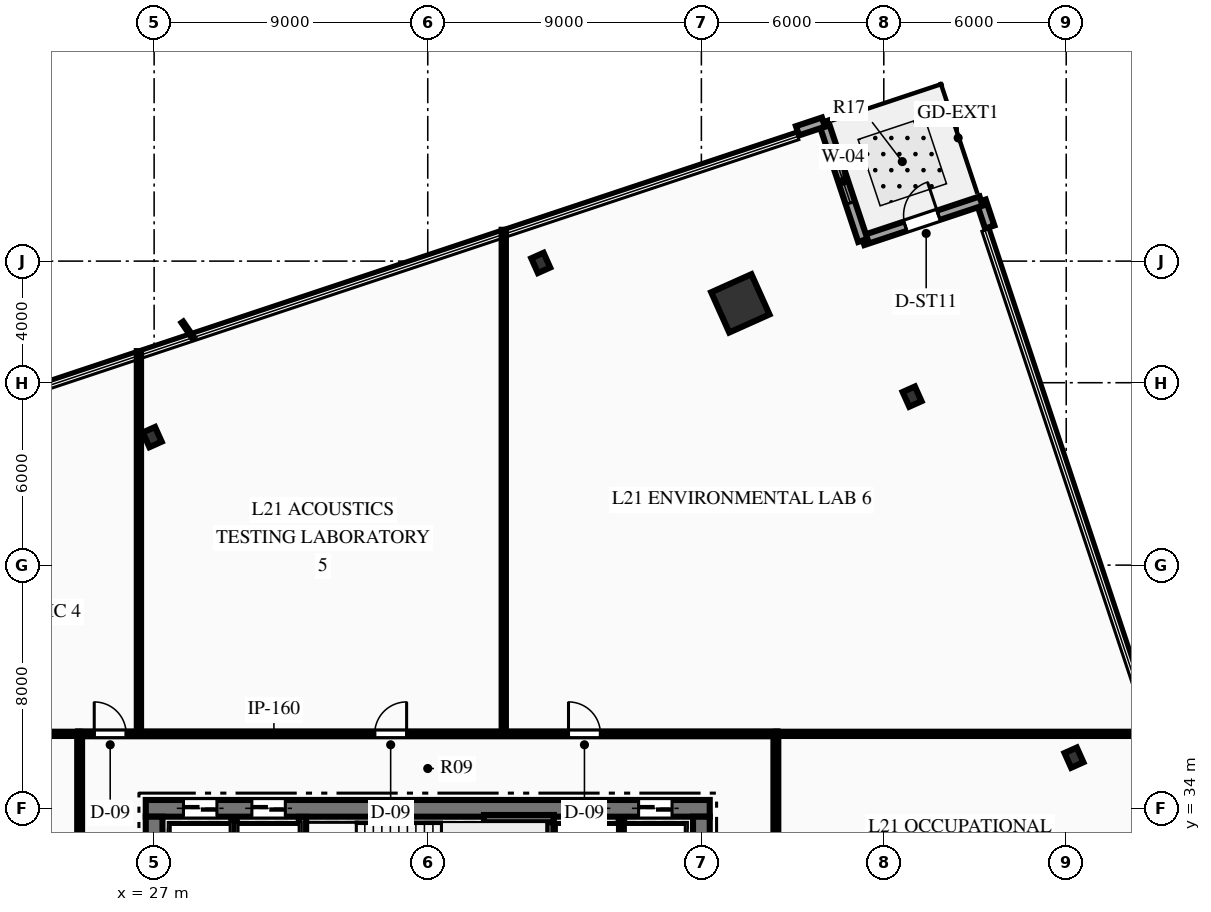
"""IFC4 building model, lengths in metres.
Left out: names, types, materials, properties, quantities, classifications, styles, units other than length and angle.
Written with IfcOpenShell. Run it as: python <this file> out.ifc"""

import sys

from ifc_helpers import new_model, si_unit, direction, frame, frame_2d, origin, origin_2d, place, context, subcontext, project, spatial, rectangle, hollow_rectangle, i_section, extrude, element, fill, save


model = new_model("IFC4")
c1 = context("Model", 3, precision=1e-05, world=origin(), true_north=direction((0.0, 1.0)))
c2 = subcontext(c1, "Body", "Model", "MODEL_VIEW")
j1 = project(units=[si_unit("LENGTHUNIT", "METRE"), si_unit("PLANEANGLEUNIT", "RADIAN")], contexts=[c1])
p1 = place(None, origin())
s1 = spatial("IfcSite", under=j1, at=p1, CompositionType="ELEMENT")
p2 = place(p1, origin())
s2 = spatial("IfcBuilding", under=s1, at=p2, CompositionType="ELEMENT")
p3 = place(p2, frame((0.0, 0.0, 90.45)))
s3 = spatial("IfcBuildingStorey", under=s2, at=p3, CompositionType="ELEMENT", Elevation=90.45)
p4 = place(p3, frame((26.725, 34.0, 0.0), z_axis=(0.0, 0.0, 1.0), x_axis=(1.0, 0.0, 0.0)))
e1 = element("IfcWall", 1, at=p4, inside=s3, PredefinedType="SHEAR", context=c2, shape_type="SweptSolid", body=[
    extrude(rectangle(XDim=18.55, YDim=0.55, at=frame_2d((9.275, 0.0))), origin(), (0.0, 0.0, 1.0), 3.75),
])
p5 = place(p4, frame((1.24, 0.0, 0.0)))
e2 = element("IfcOpeningElement", 2, at=p5, cuts=e1, PredefinedType="OPENING", context=c2, shape_type="SweptSolid", body=[
    extrude(rectangle(XDim=1.1, YDim=2.15, at=frame_2d((0.55, 1.075))), frame((0.0, 0.285, 0.0), z_axis=(0.0, -1.0, 0.0), x_axis=(1.0, 0.0, 0.0)), (0.0, 0.0, 1.0), 0.57),
])
p6 = place(p4, frame((3.49, 0.0, 0.0)))
e3 = element("IfcOpeningElement", 3, at=p6, cuts=e1, PredefinedType="OPENING", context=c2, shape_type="SweptSolid", body=[
    extrude(rectangle(XDim=1.1, YDim=2.15, at=frame_2d((0.55, 1.075))), frame((0.0, 0.285, 0.0), z_axis=(0.0, -1.0, 0.0), x_axis=(1.0, 0.0, 0.0)), (0.0, 0.0, 1.0), 0.57),
])
p7 = place(p4, frame((13.96, 0.0, 0.0)))
e4 = element("IfcOpeningElement", 4, at=p7, cuts=e1, PredefinedType="OPENING", context=c2, shape_type="SweptSolid", body=[
    extrude(rectangle(XDim=1.1, YDim=2.15, at=frame_2d((0.55, 1.075))), frame((0.0, 0.285, 0.0), z_axis=(0.0, -1.0, 0.0), x_axis=(1.0, 0.0, 0.0)), (0.0, 0.0, 1.0), 0.57),
])
p8 = place(p4, frame((16.21, 0.0, 0.0)))
e5 = element("IfcOpeningElement", 5, at=p8, cuts=e1, PredefinedType="OPENING", context=c2, shape_type="SweptSolid", body=[
    extrude(rectangle(XDim=1.1, YDim=2.15, at=frame_2d((0.55, 1.075))), frame((0.0, 0.285, 0.0), z_axis=(0.0, -1.0, 0.0), x_axis=(1.0, 0.0, 0.0)), (0.0, 0.0, 1.0), 0.57),
])
p9 = place(p3, frame((27.0, 18.275, 0.0), z_axis=(0.0, 0.0, 1.0), x_axis=(0.0, 1.0, 0.0)))
e6 = element("IfcWall", 6, at=p9, inside=s3, PredefinedType="SHEAR", context=c2, shape_type="SweptSolid", body=[
    extrude(rectangle(XDim=15.45, YDim=0.55, at=frame_2d((7.725, 0.0))), origin(), (0.0, 0.0, 1.0), 3.75),
])
p10 = place(p9, frame((9.965, 0.0, 0.0)))
e7 = element("IfcOpeningElement", 7, at=p10, cuts=e6, PredefinedType="OPENING", context=c2, shape_type="SweptSolid", body=[
    extrude(rectangle(XDim=1.4, YDim=2.2, at=frame_2d((0.7, 1.1))), frame((0.0, 0.285, 0.0), z_axis=(0.0, -1.0, 0.0), x_axis=(1.0, 0.0, 0.0)), (0.0, 0.0, 1.0), 0.57),
])
p11 = place(p3, frame((45.0, 18.275, 0.0), z_axis=(0.0, 0.0, 1.0), x_axis=(0.0, 1.0, 0.0)))
e8 = element("IfcWall", 8, at=p11, inside=s3, PredefinedType="SHEAR", context=c2, shape_type="SweptSolid", body=[
    extrude(rectangle(XDim=15.45, YDim=0.55, at=frame_2d((7.725, 0.0))), origin(), (0.0, 0.0, 1.0), 3.75),
])
p12 = place(p11, frame((9.965, 0.0, 0.0)))
e9 = element("IfcOpeningElement", 9, at=p12, cuts=e8, PredefinedType="OPENING", context=c2, shape_type="SweptSolid", body=[
    extrude(rectangle(XDim=1.4, YDim=2.2, at=frame_2d((0.7, 1.1))), frame((0.0, 0.285, 0.0), z_axis=(0.0, -1.0, 0.0), x_axis=(1.0, 0.0, 0.0)), (0.0, 0.0, 1.0), 0.57),
])
p13 = place(p3, frame((31.88, 29.93, 0.0), z_axis=(0.0, 0.0, 1.0), x_axis=(0.0, 1.0, 0.0)))
e10 = element("IfcWall", 10, at=p13, inside=s3, PredefinedType="SHEAR", context=c2, shape_type="SweptSolid", body=[
    extrude(rectangle(XDim=3.79, YDim=0.24, at=frame_2d((1.895, 0.0))), origin(), (0.0, 0.0, 1.0), 3.75),
])
p14 = place(p3, frame((40.02, 29.93, 0.0), z_axis=(0.0, 0.0, 1.0), x_axis=(0.0, 1.0, 0.0)))
e11 = element("IfcWall", 11, at=p14, inside=s3, PredefinedType="SHEAR", context=c2, shape_type="SweptSolid", body=[
    extrude(rectangle(XDim=3.85, YDim=0.24, at=frame_2d((1.925, 0.0))), origin(), (0.0, 0.0, 1.0), 3.75),
])
p15 = place(p3, frame((37.85, 33.66, 0.0), z_axis=(0.0, 0.0, 1.0), x_axis=(1.0, 0.0, 0.0)))
e12 = element("IfcWall", 12, at=p15, inside=s3, PredefinedType="SHEAR", context=c2, shape_type="SweptSolid", body=[
    extrude(rectangle(XDim=2.29, YDim=0.24, at=frame_2d((1.145, 0.0))), origin(), (0.0, 0.0, 1.0), 3.75),
])
p16 = place(p3, frame((46.281, 50.61, 0.0), z_axis=(0.0, 0.0, 1.0), x_axis=(0.912477494148, 0.409126902895, 0.0)))
e13 = element("IfcColumn", 13, at=p16, inside=s3, PredefinedType="COLUMN", context=c2, shape_type="SweptSolid", body=[
    extrude(hollow_rectangle(XDim=1.45, YDim=1.45, WallThickness=0.07, at=origin_2d()), origin(), (0.0, 0.0, 1.0), 3.75),
])
for number, where, z_axis, x_axis in (
    (14, (57.255, 35.667, 0.0), (0.0, 0.0, 1.0), (0.912, 0.409, 0.0)),
    (15, (51.93, 47.543, 0.0), (0.0, 0.0, 1.0), (0.912, 0.409, 0.0)),
    (16, (39.716, 51.941, 0.0), (0.0, 0.0, 1.0), (0.912, 0.409, 0.0)),
    (17, (26.938, 46.211, 0.0), (0.0, 0.0, 1.0), (0.912, 0.409, 0.0)),
):
    element("IfcColumn", number, at=place(p3, frame(where, z_axis=z_axis, x_axis=x_axis)), inside=s3, PredefinedType="COLUMN", context=c2, shape_type="SweptSolid", body=[
        extrude(i_section(OverallWidth=0.442, OverallDepth=0.531, WebThickness=0.066, FlangeThickness=0.106, at=origin_2d()), origin(), (0.0, 0.0, 1.0), 3.75),
    ])
p17 = place(p3, frame((54.2, 53.975, 0.0), z_axis=(0.0, 0.0, 1.0), x_axis=(0.315739467227, -0.948845924708, 0.0)))
e18 = element("IfcWall", 18, at=p17, inside=s3, PredefinedType="STANDARD", context=c2, shape_type="SweptSolid", body=[
    extrude(rectangle(XDim=0.9, YDim=0.32, at=frame_2d((0.45, 0.0))), origin(), (0.0, 0.0, 1.0), 3.45),
])
p18 = place(p3, frame((50.31, 52.681, 0.0), z_axis=(0.0, 0.0, 1.0), x_axis=(0.948873674662, 0.315656062089, 0.0)))
e19 = element("IfcWall", 19, at=p18, inside=s3, PredefinedType="STANDARD", context=c2, shape_type="SweptSolid", body=[
    extrude(rectangle(XDim=4.1, YDim=0.32, at=frame_2d((2.05, 0.0))), origin(), (0.0, 0.0, 1.0), 3.45),
])
p19 = place(p18, frame((1.475, 0.0, 0.0)))
e20 = element("IfcOpeningElement", 20, at=p19, cuts=e19, PredefinedType="OPENING", context=c2, shape_type="SweptSolid", body=[
    extrude(rectangle(XDim=1.15, YDim=2.2, at=frame_2d((0.575, 1.1))), frame((0.0, 0.17, 0.0), z_axis=(0.0, -1.0, 0.0), x_axis=(1.0, 0.0, 0.0)), (0.0, 0.0, 1.0), 0.34),
])
p20 = place(p3, frame((49.016, 56.571, 0.0), z_axis=(0.0, 0.0, 1.0), x_axis=(0.315656062089, -0.948873674662, 0.0)))
e21 = element("IfcWall", 21, at=p20, inside=s3, PredefinedType="STANDARD", context=c2, shape_type="SweptSolid", body=[
    extrude(rectangle(XDim=4.1, YDim=0.32, at=frame_2d((2.05, 0.0))), origin(), (0.0, 0.0, 1.0), 3.45),
])
p21 = place(p20, frame((1.3, 0.0, 0.85)))
e22 = element("IfcOpeningElement", 22, at=p21, cuts=e21, PredefinedType="OPENING", context=c2, shape_type="SweptSolid", body=[
    extrude(rectangle(XDim=1.5, YDim=2.1, at=frame_2d((0.75, 1.05))), frame((0.0, 0.17, 0.0), z_axis=(0.0, -1.0, 0.0), x_axis=(1.0, 0.0, 0.0)), (0.0, 0.0, 1.0), 0.34),
])
p22 = place(p3, frame((48.162, 56.287, 0.0), z_axis=(0.0, 0.0, 1.0), x_axis=(0.948845924708, 0.315739467227, 0.0)))
e23 = element("IfcWall", 23, at=p22, inside=s3, PredefinedType="STANDARD", context=c2, shape_type="SweptSolid", body=[
    extrude(rectangle(XDim=0.9, YDim=0.32, at=frame_2d((0.45, 0.0))), origin(), (0.0, 0.0, 1.0), 3.45),
])
for number, where, z_axis, x_axis in (
    (24, (29.63, 29.9, 0.0), (0.0, 0.0, 1.0), (0.0, 1.0, 0.0)),
    (25, (42.37, 29.9, 0.0), (0.0, 0.0, 1.0), (0.0, 1.0, 0.0)),
):
    element("IfcWall", number, at=place(p3, frame(where, z_axis=z_axis, x_axis=x_axis)), inside=s3, PredefinedType="PARTITIONING", context=c2, shape_type="SweptSolid", body=[
        extrude(rectangle(XDim=3.75, YDim=0.18, at=frame_2d((1.875, 0.0))), origin(), (0.0, 0.0, 1.0), 3.45),
    ])
p23 = place(p3, frame((24.5, 36.45, 0.0), z_axis=(0.0, 0.0, 1.0), x_axis=(1.0, 0.0, 0.0)))
e26 = element("IfcWall", 26, at=p23, inside=s3, PredefinedType="PARTITIONING", context=c2, shape_type="SweptSolid", body=[
    extrude(rectangle(XDim=23.0, YDim=0.16, at=frame_2d((11.5, 0.0))), origin(), (0.0, 0.0, 1.0), 3.45),
])
p24 = place(p23, frame((0.53, 0.0, 0.0)))
e27 = element("IfcOpeningElement", 27, at=p24, cuts=e26, PredefinedType="OPENING", context=c2, shape_type="SweptSolid", body=[
    extrude(rectangle(XDim=1.05, YDim=2.15, at=frame_2d((0.525, 1.075))), frame((0.0, 0.09, 0.0), z_axis=(0.0, -1.0, 0.0), x_axis=(1.0, 0.0, 0.0)), (0.0, 0.0, 1.0), 0.18),
])
p25 = place(p23, frame((9.755, 0.0, 0.0)))
e28 = element("IfcOpeningElement", 28, at=p25, cuts=e26, PredefinedType="OPENING", context=c2, shape_type="SweptSolid", body=[
    extrude(rectangle(XDim=1.05, YDim=2.15, at=frame_2d((0.525, 1.075))), frame((0.0, 0.09, 0.0), z_axis=(0.0, -1.0, 0.0), x_axis=(1.0, 0.0, 0.0)), (0.0, 0.0, 1.0), 0.18),
])
p26 = place(p23, frame((16.129, 0.0, 0.0)))
e29 = element("IfcOpeningElement", 29, at=p26, cuts=e26, PredefinedType="OPENING", context=c2, shape_type="SweptSolid", body=[
    extrude(rectangle(XDim=1.05, YDim=2.15, at=frame_2d((0.525, 1.075))), frame((0.0, 0.09, 0.0), z_axis=(0.0, -1.0, 0.0), x_axis=(1.0, 0.0, 0.0)), (0.0, 0.0, 1.0), 0.18),
])
p27 = place(p3, frame((24.55, 15.55, 0.0), z_axis=(0.0, 0.0, 1.0), x_axis=(0.0, 1.0, 0.0)))
e30 = element("IfcWall", 30, at=p27, inside=s3, PredefinedType="PARTITIONING", context=c2, shape_type="SweptSolid", body=[
    extrude(rectangle(XDim=20.9, YDim=0.16, at=frame_2d((10.45, 0.0))), origin(), (0.0, 0.0, 1.0), 3.45),
])
p28 = place(p27, frame((5.075, 0.0, 0.0)))
e31 = element("IfcOpeningElement", 31, at=p28, cuts=e30, PredefinedType="OPENING", context=c2, shape_type="SweptSolid", body=[
    extrude(rectangle(XDim=0.95, YDim=2.15, at=frame_2d((0.475, 1.075))), frame((0.0, 0.09, 0.0), z_axis=(0.0, -1.0, 0.0), x_axis=(1.0, 0.0, 0.0)), (0.0, 0.0, 1.0), 0.18),
])
p29 = place(p27, frame((12.524, 0.0, 0.0)))
e32 = element("IfcOpeningElement", 32, at=p29, cuts=e30, PredefinedType="OPENING", context=c2, shape_type="SweptSolid", body=[
    extrude(rectangle(XDim=1.05, YDim=2.15, at=frame_2d((0.525, 1.075))), frame((0.0, 0.09, 0.0), z_axis=(0.0, -1.0, 0.0), x_axis=(1.0, 0.0, 0.0)), (0.0, 0.0, 1.0), 0.18),
])
p30 = place(p3, frame((47.45, 15.55, 0.0), z_axis=(0.0, 0.0, 1.0), x_axis=(0.0, 1.0, 0.0)))
e33 = element("IfcWall", 33, at=p30, inside=s3, PredefinedType="PARTITIONING", context=c2, shape_type="SweptSolid", body=[
    extrude(rectangle(XDim=20.9, YDim=0.16, at=frame_2d((10.45, 0.0))), origin(), (0.0, 0.0, 1.0), 3.45),
])
p31 = place(p30, frame((4.087, 0.0, 0.0)))
e34 = element("IfcOpeningElement", 34, at=p31, cuts=e33, PredefinedType="OPENING", context=c2, shape_type="SweptSolid", body=[
    extrude(rectangle(XDim=1.05, YDim=2.15, at=frame_2d((0.525, 1.075))), frame((0.0, 0.09, 0.0), z_axis=(0.0, -1.0, 0.0), x_axis=(1.0, 0.0, 0.0)), (0.0, 0.0, 1.0), 0.18),
])
p32 = place(p30, frame((7.885, 0.0, 0.0)))
e35 = element("IfcOpeningElement", 35, at=p32, cuts=e33, PredefinedType="OPENING", context=c2, shape_type="SweptSolid", body=[
    extrude(rectangle(XDim=1.05, YDim=2.15, at=frame_2d((0.525, 1.075))), frame((0.0, 0.09, 0.0), z_axis=(0.0, -1.0, 0.0), x_axis=(1.0, 0.0, 0.0)), (0.0, 0.0, 1.0), 0.18),
])
p33 = place(p30, frame((14.743, 0.0, 0.0)))
e36 = element("IfcOpeningElement", 36, at=p33, cuts=e33, PredefinedType="OPENING", context=c2, shape_type="SweptSolid", body=[
    extrude(rectangle(XDim=1.05, YDim=2.15, at=frame_2d((0.525, 1.075))), frame((0.0, 0.09, 0.0), z_axis=(0.0, -1.0, 0.0), x_axis=(1.0, 0.0, 0.0)), (0.0, 0.0, 1.0), 0.18),
])
p34 = place(p3, frame((5.06, 36.45, 0.0), z_axis=(0.0, 0.0, 1.0), x_axis=(1.0, 0.0, 0.0)))
e37 = element("IfcWall", 37, at=p34, inside=s3, PredefinedType="PARTITIONING", context=c2, shape_type="SweptSolid", body=[
    extrude(rectangle(XDim=19.49, YDim=0.14, at=frame_2d((9.745, 0.0))), origin(), (0.0, 0.0, 1.0), 3.45),
])
p35 = place(p3, frame((47.45, 36.45, 0.0), z_axis=(0.0, 0.0, 1.0), x_axis=(1.0, 0.0, 0.0)))
e38 = element("IfcWall", 38, at=p35, inside=s3, PredefinedType="PARTITIONING", context=c2, shape_type="SweptSolid", body=[
    extrude(rectangle(XDim=12.538, YDim=0.14, at=frame_2d((6.269, 0.0))), origin(), (0.0, 0.0, 1.0), 3.45),
])
p36 = place(p3, frame((26.5, 36.45, 0.0), z_axis=(0.0, 0.0, 1.0), x_axis=(0.0, 1.0, 0.0)))
e39 = element("IfcWall", 39, at=p36, inside=s3, PredefinedType="PARTITIONING", context=c2, shape_type="SweptSolid", body=[
    extrude(rectangle(XDim=12.589, YDim=0.14, at=frame_2d((6.295, 0.0))), origin(), (0.0, 0.0, 1.0), 3.45),
])
p37 = place(p3, frame((38.5, 36.45, 0.0), z_axis=(0.0, 0.0, 1.0), x_axis=(0.0, 1.0, 0.0)))
e40 = element("IfcWall", 40, at=p37, inside=s3, PredefinedType="PARTITIONING", context=c2, shape_type="SweptSolid", body=[
    extrude(rectangle(XDim=16.581, YDim=0.14, at=frame_2d((8.291, 0.0))), origin(), (0.0, 0.0, 1.0), 3.45),
])
p38 = place(p19, origin())
e41 = element("IfcDoor", 41, at=p38, inside=s3, OperationType="SINGLE_SWING_RIGHT", PredefinedType="DOOR", context=c2, shape_type="SweptSolid", body=[
    extrude(rectangle(XDim=1.15, YDim=2.2, at=frame_2d((0.575, 1.1))), frame((0.0, 0.025, 0.0), z_axis=(0.0, -1.0, 0.0), x_axis=(1.0, 0.0, 0.0)), (0.0, 0.0, 1.0), 0.05),
])
fill(e20, e41)
p39 = place(p21, origin())
e42 = element("IfcWindow", 42, at=p39, inside=s3, PartitioningType="SINGLE_PANEL", PredefinedType="WINDOW", context=c2, shape_type="SweptSolid", body=[
    extrude(rectangle(XDim=1.5, YDim=2.1, at=frame_2d((0.75, 1.05))), frame((0.0, 0.03, 0.0), z_axis=(0.0, -1.0, 0.0), x_axis=(1.0, 0.0, 0.0)), (0.0, 0.0, 1.0), 0.06),
])
fill(e22, e42)
p40 = place(p24, origin())
e43 = element("IfcDoor", 43, at=p40, inside=s3, OperationType="SINGLE_SWING_LEFT", PredefinedType="DOOR", context=c2, shape_type="SweptSolid", body=[
    extrude(rectangle(XDim=1.05, YDim=2.15, at=frame_2d((0.525, 1.075))), frame((0.0, 0.025, 0.0), z_axis=(0.0, -1.0, 0.0), x_axis=(1.0, 0.0, 0.0)), (0.0, 0.0, 1.0), 0.05),
])
fill(e27, e43)
p41 = place(p25, origin())
e44 = element("IfcDoor", 44, at=p41, inside=s3, OperationType="SINGLE_SWING_RIGHT", PredefinedType="DOOR", context=c2, shape_type="SweptSolid", body=[
    extrude(rectangle(XDim=1.05, YDim=2.15, at=frame_2d((0.525, 1.075))), frame((0.0, 0.025, 0.0), z_axis=(0.0, -1.0, 0.0), x_axis=(1.0, 0.0, 0.0)), (0.0, 0.0, 1.0), 0.05),
])
fill(e28, e44)
p42 = place(p26, origin())
e45 = element("IfcDoor", 45, at=p42, inside=s3, OperationType="SINGLE_SWING_LEFT", PredefinedType="DOOR", context=c2, shape_type="SweptSolid", body=[
    extrude(rectangle(XDim=1.05, YDim=2.15, at=frame_2d((0.525, 1.075))), frame((0.0, 0.025, 0.0), z_axis=(0.0, -1.0, 0.0), x_axis=(1.0, 0.0, 0.0)), (0.0, 0.0, 1.0), 0.05),
])
fill(e29, e45)
p43 = place(p5, origin())
e46 = element("IfcDoor", 46, at=p43, inside=s3, OperationType="SLIDING_TO_LEFT", PredefinedType="DOOR", context=c2, shape_type="SweptSolid", body=[
    extrude(rectangle(XDim=1.1, YDim=2.15, at=frame_2d((0.55, 1.075))), frame((0.0, 0.025, 0.0), z_axis=(0.0, -1.0, 0.0), x_axis=(1.0, 0.0, 0.0)), (0.0, 0.0, 1.0), 0.05),
])
fill(e2, e46)
p44 = place(p6, origin())
e47 = element("IfcDoor", 47, at=p44, inside=s3, OperationType="SLIDING_TO_LEFT", PredefinedType="DOOR", context=c2, shape_type="SweptSolid", body=[
    extrude(rectangle(XDim=1.1, YDim=2.15, at=frame_2d((0.55, 1.075))), frame((0.0, 0.025, 0.0), z_axis=(0.0, -1.0, 0.0), x_axis=(1.0, 0.0, 0.0)), (0.0, 0.0, 1.0), 0.05),
])
fill(e3, e47)
p45 = place(p7, origin())
e48 = element("IfcDoor", 48, at=p45, inside=s3, OperationType="SLIDING_TO_LEFT", PredefinedType="DOOR", context=c2, shape_type="SweptSolid", body=[
    extrude(rectangle(XDim=1.1, YDim=2.15, at=frame_2d((0.55, 1.075))), frame((0.0, 0.025, 0.0), z_axis=(0.0, -1.0, 0.0), x_axis=(1.0, 0.0, 0.0)), (0.0, 0.0, 1.0), 0.05),
])
fill(e4, e48)
p46 = place(p8, origin())
e49 = element("IfcDoor", 49, at=p46, inside=s3, OperationType="SLIDING_TO_LEFT", PredefinedType="DOOR", context=c2, shape_type="SweptSolid", body=[
    extrude(rectangle(XDim=1.1, YDim=2.15, at=frame_2d((0.55, 1.075))), frame((0.0, 0.025, 0.0), z_axis=(0.0, -1.0, 0.0), x_axis=(1.0, 0.0, 0.0)), (0.0, 0.0, 1.0), 0.05),
])
fill(e5, e49)
save(model, sys.argv[1])
